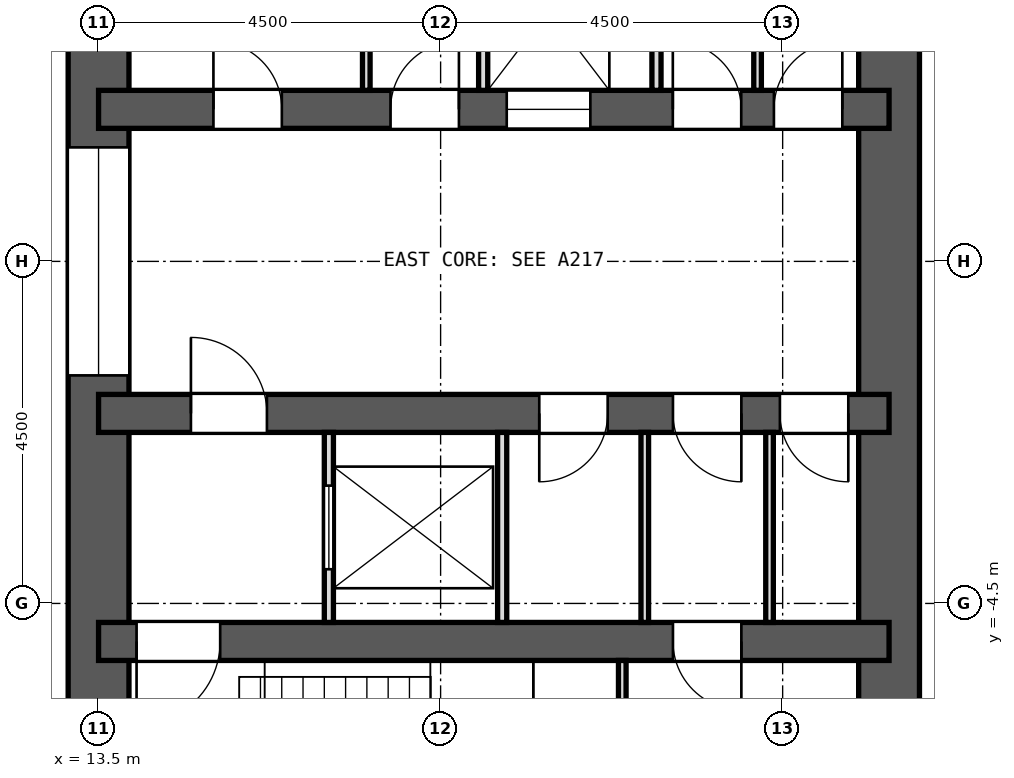
"""IFC4 building model, lengths in metres.
Left out: names, types, materials, properties, quantities, classifications, styles, units other than length and angle.
Written with IfcOpenShell. Run it as: python <this file> out.ifc"""

import sys

from ifc_helpers import new_model, si_unit, direction, frame, frame_2d, origin, place, context, subcontext, project, spatial, rectangle, extrude, element, fill, save


model = new_model("IFC4")
c1 = context("Model", 3, precision=1e-05, world=origin(), true_north=direction((0.0, 1.0)))
c2 = subcontext(c1, "Body", "Model", "MODEL_VIEW")
j1 = project(units=[si_unit("LENGTHUNIT", "METRE"), si_unit("PLANEANGLEUNIT", "RADIAN")], contexts=[c1])
p1 = place(None, origin())
s1 = spatial("IfcSite", under=j1, at=p1, CompositionType="ELEMENT")
p2 = place(p1, origin())
s2 = spatial("IfcBuilding", under=s1, at=p2, CompositionType="ELEMENT")
p3 = place(p2, frame((0.0, 0.0, 91.9)))
s3 = spatial("IfcBuildingStorey", under=s2, at=p3, CompositionType="ELEMENT", Elevation=91.9)
p4 = place(p3, frame((13.5, -9.0, 0.0), z_axis=(0.0, 0.0, 1.0), x_axis=(0.0, 1.0, 0.0)))
e1 = element("IfcWall", 1, at=p4, inside=s3, PredefinedType="SHEAR", context=c2, shape_type="SweptSolid", body=[
    extrude(rectangle(XDim=18.0, YDim=0.8, at=frame_2d((9.0, 0.0))), origin(), (0.0, 0.0, 1.0), 3.3),
])
p5 = place(p4, frame((15.4, 0.0, 0.0)))
e2 = element("IfcOpeningElement", 2, at=p5, cuts=e1, PredefinedType="OPENING", context=c2, shape_type="SweptSolid", body=[
    extrude(rectangle(XDim=1.2, YDim=2.1, at=frame_2d((0.6, 1.05))), frame((0.0, 0.412, 0.0), z_axis=(0.0, -1.0, 0.0), x_axis=(1.0, 0.0, 0.0)), (0.0, 0.0, 1.0), 0.824),
])
p6 = place(p4, frame((1.4, 0.0, 0.0)))
e3 = element("IfcOpeningElement", 3, at=p6, cuts=e1, PredefinedType="OPENING", context=c2, shape_type="SweptSolid", body=[
    extrude(rectangle(XDim=1.2, YDim=2.1, at=frame_2d((0.6, 1.05))), frame((0.0, 0.412, 0.0), z_axis=(0.0, -1.0, 0.0), x_axis=(1.0, 0.0, 0.0)), (0.0, 0.0, 1.0), 0.824),
])
p7 = place(p4, frame((7.5, 0.0, 0.0)))
e4 = element("IfcOpeningElement", 4, at=p7, cuts=e1, PredefinedType="OPENING", context=c2, shape_type="SweptSolid", body=[
    extrude(rectangle(XDim=3.0, YDim=2.4, at=frame_2d((1.5, 1.2))), frame((0.0, 0.412, 0.0), z_axis=(0.0, -1.0, 0.0), x_axis=(1.0, 0.0, 0.0)), (0.0, 0.0, 1.0), 0.824),
])
p8 = place(p3, frame((23.9, -9.0, 0.0), z_axis=(0.0, 0.0, 1.0), x_axis=(0.0, 1.0, 0.0)))
e5 = element("IfcWall", 5, at=p8, inside=s3, PredefinedType="SHEAR", context=c2, shape_type="SweptSolid", body=[
    extrude(rectangle(XDim=18.0, YDim=0.8, at=frame_2d((9.0, 0.0))), origin(), (0.0, 0.0, 1.0), 3.3),
])
p9 = place(p3, frame((13.5, -5.0, 0.0), z_axis=(0.0, 0.0, 1.0), x_axis=(1.0, 0.0, 0.0)))
e6 = element("IfcWall", 6, at=p9, inside=s3, PredefinedType="SHEAR", context=c2, shape_type="SweptSolid", body=[
    extrude(rectangle(XDim=10.4, YDim=0.5, at=frame_2d((5.2, 0.0))), origin(), (0.0, 0.0, 1.0), 3.3),
])
p10 = place(p9, frame((7.557, 0.0, 0.0)))
e7 = element("IfcOpeningElement", 7, at=p10, cuts=e6, PredefinedType="OPENING", context=c2, shape_type="SweptSolid", body=[
    extrude(rectangle(XDim=0.9, YDim=2.1, at=frame_2d((0.45, 1.05))), frame((0.0, 0.262, 0.0), z_axis=(0.0, -1.0, 0.0), x_axis=(1.0, 0.0, 0.0)), (0.0, 0.0, 1.0), 0.524),
])
p11 = place(p9, frame((0.5, 0.0, 0.0)))
e8 = element("IfcOpeningElement", 8, at=p11, cuts=e6, PredefinedType="OPENING", context=c2, shape_type="SweptSolid", body=[
    extrude(rectangle(XDim=1.1, YDim=2.1, at=frame_2d((0.55, 1.05))), frame((0.0, 0.262, 0.0), z_axis=(0.0, -1.0, 0.0), x_axis=(1.0, 0.0, 0.0)), (0.0, 0.0, 1.0), 0.524),
])
p12 = place(p3, frame((13.5, 2.0, 0.0), z_axis=(0.0, 0.0, 1.0), x_axis=(1.0, 0.0, 0.0)))
e9 = element("IfcWall", 9, at=p12, inside=s3, PredefinedType="SHEAR", context=c2, shape_type="SweptSolid", body=[
    extrude(rectangle(XDim=10.4, YDim=0.5, at=frame_2d((5.2, 0.0))), origin(), (0.0, 0.0, 1.0), 3.3),
])
p13 = place(p12, frame((5.37, 0.0, 0.0)))
e10 = element("IfcOpeningElement", 10, at=p13, cuts=e9, PredefinedType="OPENING", context=c2, shape_type="SweptSolid", body=[
    extrude(rectangle(XDim=1.1, YDim=2.1, at=frame_2d((0.55, 1.05))), frame((0.0, 0.262, 0.0), z_axis=(0.0, -1.0, 0.0), x_axis=(1.0, 0.0, 0.0)), (0.0, 0.0, 1.0), 0.524),
])
p14 = place(p12, frame((1.511, 0.0, 0.0)))
e11 = element("IfcOpeningElement", 11, at=p14, cuts=e9, PredefinedType="OPENING", context=c2, shape_type="SweptSolid", body=[
    extrude(rectangle(XDim=0.9, YDim=2.1, at=frame_2d((0.45, 1.05))), frame((0.0, 0.262, 0.0), z_axis=(0.0, -1.0, 0.0), x_axis=(1.0, 0.0, 0.0)), (0.0, 0.0, 1.0), 0.524),
])
p15 = place(p12, frame((3.841, 0.0, 0.0)))
e12 = element("IfcOpeningElement", 12, at=p15, cuts=e9, PredefinedType="OPENING", context=c2, shape_type="SweptSolid", body=[
    extrude(rectangle(XDim=0.9, YDim=2.1, at=frame_2d((0.45, 1.05))), frame((0.0, 0.262, 0.0), z_axis=(0.0, -1.0, 0.0), x_axis=(1.0, 0.0, 0.0)), (0.0, 0.0, 1.0), 0.524),
])
p16 = place(p12, frame((7.555, 0.0, 0.0)))
e13 = element("IfcOpeningElement", 13, at=p16, cuts=e9, PredefinedType="OPENING", context=c2, shape_type="SweptSolid", body=[
    extrude(rectangle(XDim=0.9, YDim=2.1, at=frame_2d((0.45, 1.05))), frame((0.0, 0.262, 0.0), z_axis=(0.0, -1.0, 0.0), x_axis=(1.0, 0.0, 0.0)), (0.0, 0.0, 1.0), 0.524),
])
p17 = place(p12, frame((8.885, 0.0, 0.0)))
e14 = element("IfcOpeningElement", 14, at=p17, cuts=e9, PredefinedType="OPENING", context=c2, shape_type="SweptSolid", body=[
    extrude(rectangle(XDim=0.9, YDim=2.1, at=frame_2d((0.45, 1.05))), frame((0.0, 0.262, 0.0), z_axis=(0.0, -1.0, 0.0), x_axis=(1.0, 0.0, 0.0)), (0.0, 0.0, 1.0), 0.524),
])
p18 = place(p3, frame((13.5, -2.0, 0.0), z_axis=(0.0, 0.0, 1.0), x_axis=(1.0, 0.0, 0.0)))
e15 = element("IfcWall", 15, at=p18, inside=s3, PredefinedType="SHEAR", context=c2, shape_type="SweptSolid", body=[
    extrude(rectangle(XDim=10.4, YDim=0.5, at=frame_2d((5.2, 0.0))), origin(), (0.0, 0.0, 1.0), 3.3),
])
p19 = place(p18, frame((1.215, 0.0, 0.0)))
e16 = element("IfcOpeningElement", 16, at=p19, cuts=e15, PredefinedType="OPENING", context=c2, shape_type="SweptSolid", body=[
    extrude(rectangle(XDim=1.0, YDim=2.1, at=frame_2d((0.5, 1.05))), frame((0.0, 0.262, 0.0), z_axis=(0.0, -1.0, 0.0), x_axis=(1.0, 0.0, 0.0)), (0.0, 0.0, 1.0), 0.524),
])
p20 = place(p18, frame((5.798, 0.0, 0.0)))
e17 = element("IfcOpeningElement", 17, at=p20, cuts=e15, PredefinedType="OPENING", context=c2, shape_type="SweptSolid", body=[
    extrude(rectangle(XDim=0.9, YDim=2.1, at=frame_2d((0.45, 1.05))), frame((0.0, 0.262, 0.0), z_axis=(0.0, -1.0, 0.0), x_axis=(1.0, 0.0, 0.0)), (0.0, 0.0, 1.0), 0.524),
])
p21 = place(p18, frame((7.557, 0.0, 0.0)))
e18 = element("IfcOpeningElement", 18, at=p21, cuts=e15, PredefinedType="OPENING", context=c2, shape_type="SweptSolid", body=[
    extrude(rectangle(XDim=0.9, YDim=2.1, at=frame_2d((0.45, 1.05))), frame((0.0, 0.262, 0.0), z_axis=(0.0, -1.0, 0.0), x_axis=(1.0, 0.0, 0.0)), (0.0, 0.0, 1.0), 0.524),
])
p22 = place(p18, frame((8.964, 0.0, 0.0)))
e19 = element("IfcOpeningElement", 19, at=p22, cuts=e15, PredefinedType="OPENING", context=c2, shape_type="SweptSolid", body=[
    extrude(rectangle(XDim=0.9, YDim=2.1, at=frame_2d((0.45, 1.05))), frame((0.0, 0.262, 0.0), z_axis=(0.0, -1.0, 0.0), x_axis=(1.0, 0.0, 0.0)), (0.0, 0.0, 1.0), 0.524),
])
p23 = place(p3, frame((17.022, 2.25, 0.0), z_axis=(0.0, 0.0, 1.0), x_axis=(0.0, 1.0, 0.0)))
e20 = element("IfcWall", 20, at=p23, inside=s3, PredefinedType="PARTITIONING", context=c2, shape_type="SweptSolid", body=[
    extrude(rectangle(XDim=2.5, YDim=0.1, at=frame_2d((1.25, 0.0))), origin(), (0.0, 0.0, 1.0), 2.8),
])
for number, where, z_axis, x_axis in (
    (21, (18.56, 2.25, 0.0), (0.0, 0.0, 1.0), (0.0, 1.0, 0.0)),
    (22, (20.84, 2.25, 0.0), (0.0, 0.0, 1.0), (0.0, 1.0, 0.0)),
):
    element("IfcWall", number, at=place(p3, frame(where, z_axis=z_axis, x_axis=x_axis)), inside=s3, PredefinedType="PARTITIONING", context=c2, shape_type="SweptSolid", body=[
        extrude(rectangle(XDim=2.5, YDim=0.12, at=frame_2d((1.25, 0.0))), origin(), (0.0, 0.0, 1.0), 2.8),
    ])
p24 = place(p3, frame((22.17, 2.25, 0.0), z_axis=(0.0, 0.0, 1.0), x_axis=(0.0, 1.0, 0.0)))
e23 = element("IfcWall", 23, at=p24, inside=s3, PredefinedType="PARTITIONING", context=c2, shape_type="SweptSolid", body=[
    extrude(rectangle(XDim=2.5, YDim=0.1, at=frame_2d((1.25, 0.0))), origin(), (0.0, 0.0, 1.0), 2.8),
])
p25 = place(p3, frame((16.53, -4.75, 0.0), z_axis=(0.0, 0.0, 1.0), x_axis=(0.0, 1.0, 0.0)))
e24 = element("IfcWall", 24, at=p25, inside=s3, PredefinedType="PARTITIONING", context=c2, shape_type="SweptSolid", body=[
    extrude(rectangle(XDim=2.5, YDim=0.12, at=frame_2d((1.25, 0.0))), origin(), (0.0, 0.0, 1.0), 2.8),
])
p26 = place(p25, frame((0.7, 0.0, 0.0)))
e25 = element("IfcOpeningElement", 25, at=p26, cuts=e24, PredefinedType="OPENING", context=c2, shape_type="SweptSolid", body=[
    extrude(rectangle(XDim=1.1, YDim=2.1, at=frame_2d((0.55, 1.05))), frame((0.0, 0.072, 0.0), z_axis=(0.0, -1.0, 0.0), x_axis=(1.0, 0.0, 0.0)), (0.0, 0.0, 1.0), 0.144),
])
p27 = place(p3, frame((18.81, -4.75, 0.0), z_axis=(0.0, 0.0, 1.0), x_axis=(0.0, 1.0, 0.0)))
e26 = element("IfcWall", 26, at=p27, inside=s3, PredefinedType="PARTITIONING", context=c2, shape_type="SweptSolid", body=[
    extrude(rectangle(XDim=2.5, YDim=0.12, at=frame_2d((1.25, 0.0))), origin(), (0.0, 0.0, 1.0), 2.8),
])
for number, where, z_axis, x_axis in (
    (27, (20.686, -4.75, 0.0), (0.0, 0.0, 1.0), (0.0, 1.0, 0.0)),
    (28, (22.327, -4.75, 0.0), (0.0, 0.0, 1.0), (0.0, 1.0, 0.0)),
):
    element("IfcWall", number, at=place(p3, frame(where, z_axis=z_axis, x_axis=x_axis)), inside=s3, PredefinedType="PARTITIONING", context=c2, shape_type="SweptSolid", body=[
        extrude(rectangle(XDim=2.5, YDim=0.1, at=frame_2d((1.25, 0.0))), origin(), (0.0, 0.0, 1.0), 2.8),
    ])
p28 = place(p3, frame((20.39, -8.6, 0.0), z_axis=(0.0, 0.0, 1.0), x_axis=(0.0, 1.0, 0.0)))
e29 = element("IfcWall", 29, at=p28, inside=s3, PredefinedType="PARTITIONING", context=c2, shape_type="SweptSolid", body=[
    extrude(rectangle(XDim=3.35, YDim=0.1, at=frame_2d((1.675, 0.0))), origin(), (0.0, 0.0, 1.0), 2.8),
])
p29 = place(p13, origin())
e30 = element("IfcDoor", 30, at=p29, inside=s3, OperationType="DOUBLE_DOOR_SLIDING", PredefinedType="DOOR", context=c2, shape_type="SweptSolid", body=[
    extrude(rectangle(XDim=1.1, YDim=2.1, at=frame_2d((0.55, 1.05))), frame((0.0, 0.025, 0.0), z_axis=(0.0, -1.0, 0.0), x_axis=(1.0, 0.0, 0.0)), (0.0, 0.0, 1.0), 0.05),
])
fill(e10, e30)
p30 = place(p26, origin())
e31 = element("IfcDoor", 31, at=p30, inside=s3, OperationType="DOUBLE_DOOR_SLIDING", PredefinedType="DOOR", context=c2, shape_type="SweptSolid", body=[
    extrude(rectangle(XDim=1.1, YDim=2.1, at=frame_2d((0.55, 1.05))), frame((0.0, 0.025, 0.0), z_axis=(0.0, -1.0, 0.0), x_axis=(1.0, 0.0, 0.0)), (0.0, 0.0, 1.0), 0.05),
])
fill(e25, e31)
p31 = place(p14, origin())
e32 = element("IfcDoor", 32, at=p31, inside=s3, OperationType="SINGLE_SWING_LEFT", PredefinedType="DOOR", context=c2, shape_type="SweptSolid", body=[
    extrude(rectangle(XDim=0.9, YDim=2.1, at=frame_2d((0.45, 1.05))), frame((0.0, 0.025, 0.0), z_axis=(0.0, -1.0, 0.0), x_axis=(1.0, 0.0, 0.0)), (0.0, 0.0, 1.0), 0.05),
])
fill(e11, e32)
p32 = place(p15, origin())
e33 = element("IfcDoor", 33, at=p32, inside=s3, OperationType="SINGLE_SWING_RIGHT", PredefinedType="DOOR", context=c2, shape_type="SweptSolid", body=[
    extrude(rectangle(XDim=0.9, YDim=2.1, at=frame_2d((0.45, 1.05))), frame((0.0, 0.025, 0.0), z_axis=(0.0, -1.0, 0.0), x_axis=(1.0, 0.0, 0.0)), (0.0, 0.0, 1.0), 0.05),
])
fill(e12, e33)
p33 = place(p16, origin())
e34 = element("IfcDoor", 34, at=p33, inside=s3, OperationType="SINGLE_SWING_LEFT", PredefinedType="DOOR", context=c2, shape_type="SweptSolid", body=[
    extrude(rectangle(XDim=0.9, YDim=2.1, at=frame_2d((0.45, 1.05))), frame((0.0, 0.025, 0.0), z_axis=(0.0, -1.0, 0.0), x_axis=(1.0, 0.0, 0.0)), (0.0, 0.0, 1.0), 0.05),
])
fill(e13, e34)
p34 = place(p17, origin())
e35 = element("IfcDoor", 35, at=p34, inside=s3, OperationType="SINGLE_SWING_RIGHT", PredefinedType="DOOR", context=c2, shape_type="SweptSolid", body=[
    extrude(rectangle(XDim=0.9, YDim=2.1, at=frame_2d((0.45, 1.05))), frame((0.0, 0.025, 0.0), z_axis=(0.0, -1.0, 0.0), x_axis=(1.0, 0.0, 0.0)), (0.0, 0.0, 1.0), 0.05),
])
fill(e14, e35)
p35 = place(p19, origin())
e36 = element("IfcDoor", 36, at=p35, inside=s3, OperationType="SINGLE_SWING_LEFT", PredefinedType="DOOR", context=c2, shape_type="SweptSolid", body=[
    extrude(rectangle(XDim=1.0, YDim=2.1, at=frame_2d((0.5, 1.05))), frame((0.0, 0.025, 0.0), z_axis=(0.0, -1.0, 0.0), x_axis=(1.0, 0.0, 0.0)), (0.0, 0.0, 1.0), 0.05),
])
fill(e16, e36)
p36 = place(p20, frame((0.9, 0.0, 0.0), z_axis=(0.0, 0.0, 1.0), x_axis=(-1.0, 0.0, 0.0)))
e37 = element("IfcDoor", 37, at=p36, inside=s3, OperationType="SINGLE_SWING_RIGHT", PredefinedType="DOOR", context=c2, shape_type="SweptSolid", body=[
    extrude(rectangle(XDim=0.9, YDim=2.1, at=frame_2d((0.45, 1.05))), frame((0.0, 0.025, 0.0), z_axis=(0.0, -1.0, 0.0), x_axis=(1.0, 0.0, 0.0)), (0.0, 0.0, 1.0), 0.05),
])
fill(e17, e37)
p37 = place(p21, frame((0.9, 0.0, 0.0), z_axis=(0.0, 0.0, 1.0), x_axis=(-1.0, 0.0, 0.0)))
e38 = element("IfcDoor", 38, at=p37, inside=s3, OperationType="SINGLE_SWING_LEFT", PredefinedType="DOOR", context=c2, shape_type="SweptSolid", body=[
    extrude(rectangle(XDim=0.9, YDim=2.1, at=frame_2d((0.45, 1.05))), frame((0.0, 0.025, 0.0), z_axis=(0.0, -1.0, 0.0), x_axis=(1.0, 0.0, 0.0)), (0.0, 0.0, 1.0), 0.05),
])
fill(e18, e38)
p38 = place(p22, frame((0.9, 0.0, 0.0), z_axis=(0.0, 0.0, 1.0), x_axis=(-1.0, 0.0, 0.0)))
e39 = element("IfcDoor", 39, at=p38, inside=s3, OperationType="SINGLE_SWING_LEFT", PredefinedType="DOOR", context=c2, shape_type="SweptSolid", body=[
    extrude(rectangle(XDim=0.9, YDim=2.1, at=frame_2d((0.45, 1.05))), frame((0.0, 0.025, 0.0), z_axis=(0.0, -1.0, 0.0), x_axis=(1.0, 0.0, 0.0)), (0.0, 0.0, 1.0), 0.05),
])
fill(e19, e39)
p39 = place(p10, frame((0.9, 0.0, 0.0), z_axis=(0.0, 0.0, 1.0), x_axis=(-1.0, 0.0, 0.0)))
e40 = element("IfcDoor", 40, at=p39, inside=s3, OperationType="SINGLE_SWING_LEFT", PredefinedType="DOOR", context=c2, shape_type="SweptSolid", body=[
    extrude(rectangle(XDim=0.9, YDim=2.1, at=frame_2d((0.45, 1.05))), frame((0.0, 0.025, 0.0), z_axis=(0.0, -1.0, 0.0), x_axis=(1.0, 0.0, 0.0)), (0.0, 0.0, 1.0), 0.05),
])
fill(e7, e40)
p40 = place(p11, frame((1.1, 0.0, 0.0), z_axis=(0.0, 0.0, 1.0), x_axis=(-1.0, 0.0, 0.0)))
e41 = element("IfcDoor", 41, at=p40, inside=s3, OperationType="SINGLE_SWING_RIGHT", PredefinedType="DOOR", context=c2, shape_type="SweptSolid", body=[
    extrude(rectangle(XDim=1.1, YDim=2.1, at=frame_2d((0.55, 1.05))), frame((0.0, 0.025, 0.0), z_axis=(0.0, -1.0, 0.0), x_axis=(1.0, 0.0, 0.0)), (0.0, 0.0, 1.0), 0.05),
])
fill(e8, e41)
p41 = place(p7, origin())
e42 = element("IfcDoor", 42, at=p41, inside=s3, OperationType="DOUBLE_DOOR_SLIDING", PredefinedType="DOOR", context=c2, shape_type="SweptSolid", body=[
    extrude(rectangle(XDim=3.0, YDim=2.4, at=frame_2d((1.5, 1.2))), frame((0.0, 0.025, 0.0), z_axis=(0.0, -1.0, 0.0), x_axis=(1.0, 0.0, 0.0)), (0.0, 0.0, 1.0), 0.05),
])
fill(e4, e42)
save(model, sys.argv[1])
